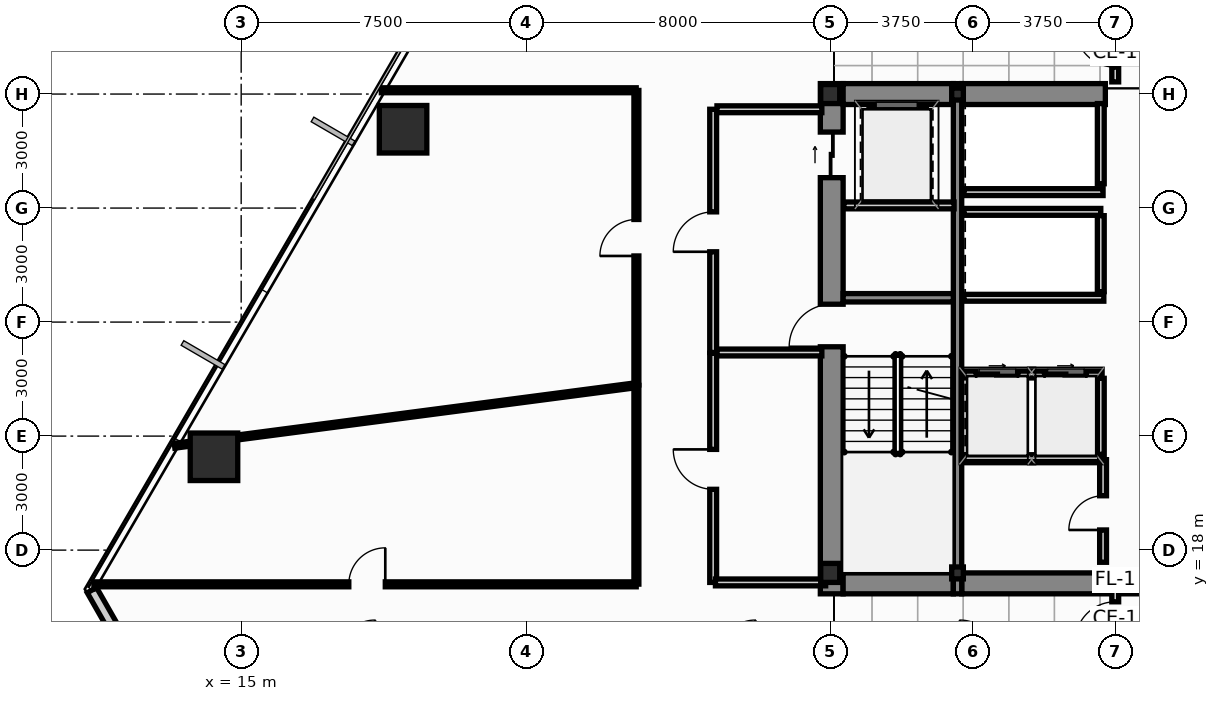
"""IFC4 building model, lengths in metres.
Left out: names, types, materials, properties, quantities, classifications, styles, units other than length and angle.
Written with IfcOpenShell. Run it as: python <this file> out.ifc"""

import sys

from ifc_helpers import new_model, si_unit, direction, frame, frame_2d, origin, origin_2d, place, context, subcontext, project, spatial, rectangle, hollow_rectangle, i_section, extrude, source, transform, mapped, element, fill, save


model = new_model("IFC4")
c1 = context("Model", 3, precision=1e-05, world=origin(), true_north=direction((0.0, 1.0)))
c2 = subcontext(c1, "Body", "Model", "MODEL_VIEW")
j1 = project(units=[si_unit("LENGTHUNIT", "METRE"), si_unit("PLANEANGLEUNIT", "RADIAN")], contexts=[c1])
p1 = place(None, origin())
s1 = spatial("IfcSite", under=j1, at=p1, CompositionType="ELEMENT")
p2 = place(p1, origin())
s2 = spatial("IfcBuilding", under=s1, at=p2, CompositionType="ELEMENT")
p3 = place(p2, frame((0.0, 0.0, 49.5)))
s3 = spatial("IfcBuildingStorey", under=s2, at=p3, CompositionType="ELEMENT", Elevation=49.5)
m1 = source(origin(), c2, "Body", "SweptSolid", [
    extrude(i_section(OverallWidth=0.5, OverallDepth=0.5, WebThickness=0.028, FlangeThickness=0.04, at=origin_2d()), origin(), (0.0, 0.0, 1.0), 3.65),
])
for number, where, z_axis, x_axis in (
    (1, (30.5, 17.4, 0.0), (0.0, 0.0, 1.0), (1.0, 0.0, 0.0)),
    (2, (30.5, 30.0, 0.0), (0.0, 0.0, 1.0), (1.0, 0.0, 0.0)),
):
    element("IfcColumn", number, at=place(p3, frame(where, z_axis=z_axis, x_axis=x_axis)), inside=s3, PredefinedType="COLUMN", context=c2, shape_type="MappedRepresentation", body=[
        mapped(m1, transform((0.0, 0.0, 0.0), scale=1.0)),
    ])
m2 = source(origin(), c2, "Body", "SweptSolid", [
    extrude(i_section(OverallWidth=0.307, OverallDepth=0.315, WebThickness=0.012, FlangeThickness=0.019, at=origin_2d()), origin(), (0.0, 0.0, 1.0), 3.65),
])
for number, where, z_axis, x_axis in (
    (3, (33.85, 17.4, 0.0), (0.0, 0.0, 1.0), (1.0, 0.0, 0.0)),
    (4, (33.85, 30.0, 0.0), (0.0, 0.0, 1.0), (1.0, 0.0, 0.0)),
):
    element("IfcColumn", number, at=place(p3, frame(where, z_axis=z_axis, x_axis=x_axis)), inside=s3, PredefinedType="COLUMN", context=c2, shape_type="MappedRepresentation", body=[
        mapped(m2, transform((0.0, 0.0, 0.0), scale=1.0)),
    ])
p4 = place(p3, frame((30.54, 16.85, 0.0), z_axis=(0.0, 0.0, 1.0), x_axis=(0.0, 1.0, 0.0)))
e5 = element("IfcWall", 5, at=p4, inside=s3, PredefinedType="SHEAR", context=c2, shape_type="SweptSolid", body=[
    extrude(rectangle(XDim=13.425, YDim=0.6, at=frame_2d((6.712, 0.0))), origin(), (0.0, 0.0, 1.0), 3.65),
])
p5 = place(p4, frame((6.5, 0.0, 0.0)))
e6 = element("IfcOpeningElement", 6, at=p5, cuts=e5, PredefinedType="OPENING", context=c2, shape_type="SweptSolid", body=[
    extrude(rectangle(XDim=1.12, YDim=2.15, at=frame_2d((0.56, 1.075))), frame((0.0, 0.312, 0.0), z_axis=(0.0, -1.0, 0.0), x_axis=(1.0, 0.0, 0.0)), (0.0, 0.0, 1.0), 0.624),
])
p6 = place(p4, frame((10.95, 0.0, 0.0)))
e7 = element("IfcOpeningElement", 7, at=p6, cuts=e5, PredefinedType="OPENING", context=c2, shape_type="SweptSolid", body=[
    extrude(rectangle(XDim=1.2, YDim=2.2, at=frame_2d((0.6, 1.1))), frame((0.0, 0.312, 0.0), z_axis=(0.0, -1.0, 0.0), x_axis=(1.0, 0.0, 0.0)), (0.0, 0.0, 1.0), 0.624),
])
p7 = place(p3, frame((30.84, 17.125, 0.0), z_axis=(0.0, 0.0, 1.0), x_axis=(1.0, 0.0, 0.0)))
e8 = element("IfcWall", 8, at=p7, inside=s3, PredefinedType="SHEAR", context=c2, shape_type="SweptSolid", body=[
    extrude(rectangle(XDim=2.9, YDim=0.55, at=frame_2d((1.45, 0.0))), origin(), (0.0, 0.0, 1.0), 3.65),
])
p8 = place(p3, frame((33.96, 17.125, 0.0), z_axis=(0.0, 0.0, 1.0), x_axis=(1.0, 0.0, 0.0)))
e9 = element("IfcWall", 9, at=p8, inside=s3, PredefinedType="SHEAR", context=c2, shape_type="SweptSolid", body=[
    extrude(rectangle(XDim=8.08, YDim=0.55, at=frame_2d((4.04, 0.0))), origin(), (0.0, 0.0, 1.0), 3.65),
])
p9 = place(p3, frame((30.84, 30.0, 0.0), z_axis=(0.0, 0.0, 1.0), x_axis=(1.0, 0.0, 0.0)))
e10 = element("IfcWall", 10, at=p9, inside=s3, PredefinedType="SHEAR", context=c2, shape_type="SweptSolid", body=[
    extrude(rectangle(XDim=2.9, YDim=0.55, at=frame_2d((1.45, 0.0))), origin(), (0.0, 0.0, 1.0), 3.65),
])
p10 = place(p3, frame((33.96, 30.0, 0.0), z_axis=(0.0, 0.0, 1.0), x_axis=(1.0, 0.0, 0.0)))
e11 = element("IfcWall", 11, at=p10, inside=s3, PredefinedType="SHEAR", context=c2, shape_type="SweptSolid", body=[
    extrude(rectangle(XDim=3.78, YDim=0.55, at=frame_2d((1.89, 0.0))), origin(), (0.0, 0.0, 1.0), 3.65),
])
p11 = place(p3, frame((33.85, 16.85, 0.0), z_axis=(0.0, 0.0, 1.0), x_axis=(0.0, 1.0, 0.0)))
e12 = element("IfcWall", 12, at=p11, inside=s3, PredefinedType="SHEAR", context=c2, shape_type="SweptSolid", body=[
    extrude(rectangle(XDim=13.425, YDim=0.22, at=frame_2d((6.712, 0.0))), origin(), (0.0, 0.0, 1.0), 3.65),
])
p12 = place(p3, frame((30.84, 24.64, 0.0), z_axis=(0.0, 0.0, 1.0), x_axis=(1.0, 0.0, 0.0)))
e13 = element("IfcWall", 13, at=p12, inside=s3, PredefinedType="SHEAR", context=c2, shape_type="SweptSolid", body=[
    extrude(rectangle(XDim=2.9, YDim=0.22, at=frame_2d((1.45, 0.0))), origin(), (0.0, 0.0, 1.0), 3.65),
])
m3 = source(origin(), c2, "Body", "SweptSolid", [
    extrude(hollow_rectangle(XDim=1.25, YDim=1.25, WallThickness=0.07, at=origin_2d()), origin(), (0.0, 0.0, 1.0), 3.651),
])
p13 = place(p3, frame((19.26, 29.074, 0.0), z_axis=(0.014913313399, -0.013776424037, 0.999793880369), x_axis=(0.678553674548, 0.734550822447, 0.0)))
e14 = element("IfcColumn", 14, at=p13, inside=s3, PredefinedType="COLUMN", context=c2, shape_type="MappedRepresentation", body=[
    mapped(m3, transform((0.0, 0.0, 0.0), scale=1.0)),
])
m4 = source(origin(), c2, "Body", "SweptSolid", [
    extrude(hollow_rectangle(XDim=1.25, YDim=1.25, WallThickness=0.07, at=origin_2d()), origin(), (0.0, 0.0, 1.0), 3.651),
])
p14 = place(p3, frame((14.284, 20.456, 0.0), z_axis=(0.010498643418, -0.021599119899, 0.999711586662), x_axis=(0.899383059768, 0.437161425336, 0.0)))
e15 = element("IfcColumn", 15, at=p14, inside=s3, PredefinedType="COLUMN", context=c2, shape_type="MappedRepresentation", body=[
    mapped(m4, transform((0.0, 0.0, 0.0), scale=1.0)),
])
p15 = place(p3, frame((18.312, 4.275, 0.0), z_axis=(0.0, 0.0, 1.0), x_axis=(-0.496075884461, 0.868279169885, 0.0)))
e16 = element("IfcWall", 16, at=p15, inside=s3, PredefinedType="STANDARD", context=c2, shape_type="SweptSolid", body=[
    extrude(rectangle(XDim=14.594, YDim=0.28, at=frame_2d((7.297, 0.0))), origin(), (0.0, 0.0, 1.0), 3.4),
])
p16 = place(p15, frame((6.85, 0.0, 0.9)))
e17 = element("IfcOpeningElement", 17, at=p16, cuts=e16, PredefinedType="OPENING", context=c2, shape_type="SweptSolid", body=[
    extrude(rectangle(XDim=1.8, YDim=1.8, at=frame_2d((0.9, 0.9))), frame((0.0, 0.152, 0.0), z_axis=(0.0, -1.0, 0.0), x_axis=(1.0, 0.0, 0.0)), (0.0, 0.0, 1.0), 0.304),
])
p17 = place(p3, frame((34.02, 22.62, 0.0), z_axis=(0.0, 0.0, 1.0), x_axis=(1.0, 0.0, 0.0)))
e18 = element("IfcWall", 18, at=p17, inside=s3, PredefinedType="PARTITIONING", context=c2, shape_type="SweptSolid", body=[
    extrude(rectangle(XDim=3.6, YDim=0.18, at=frame_2d((1.8, 0.0))), origin(), (0.0, 0.0, 1.0), 3.4),
])
p18 = place(p17, frame((0.32, 0.0, 0.0)))
e19 = element("IfcOpeningElement", 19, at=p18, cuts=e18, PredefinedType="OPENING", context=c2, shape_type="SweptSolid", body=[
    extrude(rectangle(XDim=1.1, YDim=2.2, at=frame_2d((0.55, 1.1))), frame((0.0, 0.102, 0.0), z_axis=(0.0, -1.0, 0.0), x_axis=(1.0, 0.0, 0.0)), (0.0, 0.0, 1.0), 0.204),
])
p19 = place(p17, frame((2.12, 0.0, 0.0)))
e20 = element("IfcOpeningElement", 20, at=p19, cuts=e18, PredefinedType="OPENING", context=c2, shape_type="SweptSolid", body=[
    extrude(rectangle(XDim=1.1, YDim=2.2, at=frame_2d((0.55, 1.1))), frame((0.0, 0.102, 0.0), z_axis=(0.0, -1.0, 0.0), x_axis=(1.0, 0.0, 0.0)), (0.0, 0.0, 1.0), 0.204),
])
p20 = place(p3, frame((37.62, 20.52, 0.0), z_axis=(0.0, 0.0, 1.0), x_axis=(0.0, 1.0, 0.0)))
e21 = element("IfcWall", 21, at=p20, inside=s3, PredefinedType="PARTITIONING", context=c2, shape_type="SweptSolid", body=[
    extrude(rectangle(XDim=2.0, YDim=0.18, at=frame_2d((1.0, 0.0))), origin(), (0.0, 0.0, 1.0), 3.4),
])
p21 = place(p3, frame((34.02, 26.9, 0.0), z_axis=(0.0, 0.0, 1.0), x_axis=(1.0, 0.0, 0.0)))
e22 = element("IfcWall", 22, at=p21, inside=s3, PredefinedType="PARTITIONING", context=c2, shape_type="SweptSolid", body=[
    extrude(rectangle(XDim=3.6, YDim=0.18, at=frame_2d((1.8, 0.0))), origin(), (0.0, 0.0, 1.0), 3.4),
])
p22 = place(p3, frame((37.62, 24.8, 0.0), z_axis=(0.0, 0.0, 1.0), x_axis=(0.0, 1.0, 0.0)))
e23 = element("IfcWall", 23, at=p22, inside=s3, PredefinedType="PARTITIONING", context=c2, shape_type="SweptSolid", body=[
    extrude(rectangle(XDim=2.0, YDim=0.18, at=frame_2d((1.0, 0.0))), origin(), (0.0, 0.0, 1.0), 3.4),
])
p23 = place(p3, frame((34.02, 24.64, 0.0), z_axis=(0.0, 0.0, 1.0), x_axis=(1.0, 0.0, 0.0)))
e24 = element("IfcWall", 24, at=p23, inside=s3, PredefinedType="PARTITIONING", context=c2, shape_type="SweptSolid", body=[
    extrude(rectangle(XDim=3.68, YDim=0.18, at=frame_2d((1.84, 0.0))), origin(), (0.0, 0.0, 1.0), 3.4),
])
p24 = place(p3, frame((34.02, 27.42, 0.0), z_axis=(0.0, 0.0, 1.0), x_axis=(1.0, 0.0, 0.0)))
e25 = element("IfcWall", 25, at=p24, inside=s3, PredefinedType="PARTITIONING", context=c2, shape_type="SweptSolid", body=[
    extrude(rectangle(XDim=3.66, YDim=0.18, at=frame_2d((1.83, 0.0))), origin(), (0.0, 0.0, 1.0), 3.4),
])
p25 = place(p3, frame((37.62, 27.64, 0.0), z_axis=(0.0, 0.0, 1.0), x_axis=(0.0, 1.0, 0.0)))
e26 = element("IfcWall", 26, at=p25, inside=s3, PredefinedType="PARTITIONING", context=c2, shape_type="SweptSolid", body=[
    extrude(rectangle(XDim=2.11, YDim=0.18, at=frame_2d((1.055, 0.0))), origin(), (0.0, 0.0, 1.0), 3.4),
])
p26 = place(p3, frame((27.42, 23.2, 0.0), z_axis=(0.0, 0.0, 1.0), x_axis=(0.0, 1.0, 0.0)))
e27 = element("IfcWall", 27, at=p26, inside=s3, PredefinedType="PARTITIONING", context=c2, shape_type="SweptSolid", body=[
    extrude(rectangle(XDim=6.4, YDim=0.18, at=frame_2d((3.2, 0.0))), origin(), (0.0, 0.0, 1.0), 3.4),
])
p27 = place(p26, frame((2.65, 0.0, 0.0)))
e28 = element("IfcOpeningElement", 28, at=p27, cuts=e27, PredefinedType="OPENING", context=c2, shape_type="SweptSolid", body=[
    extrude(rectangle(XDim=1.05, YDim=2.15, at=frame_2d((0.525, 1.075))), frame((0.0, 0.102, 0.0), z_axis=(0.0, -1.0, 0.0), x_axis=(1.0, 0.0, 0.0)), (0.0, 0.0, 1.0), 0.204),
])
p28 = place(p3, frame((27.52, 23.2, 0.0), z_axis=(0.0, 0.0, 1.0), x_axis=(1.0, 0.0, 0.0)))
e29 = element("IfcWall", 29, at=p28, inside=s3, PredefinedType="PARTITIONING", context=c2, shape_type="SweptSolid", body=[
    extrude(rectangle(XDim=2.76, YDim=0.18, at=frame_2d((1.38, 0.0))), origin(), (0.0, 0.0, 1.0), 3.4),
])
p29 = place(p3, frame((27.52, 29.6, 0.0), z_axis=(0.0, 0.0, 1.0), x_axis=(1.0, 0.0, 0.0)))
e30 = element("IfcWall", 30, at=p29, inside=s3, PredefinedType="PARTITIONING", context=c2, shape_type="SweptSolid", body=[
    extrude(rectangle(XDim=2.76, YDim=0.18, at=frame_2d((1.38, 0.0))), origin(), (0.0, 0.0, 1.0), 2.783),
])
p30 = place(p3, frame((30.86, 27.07, 0.0), z_axis=(0.0, 0.0, 1.0), x_axis=(1.0, 0.0, 0.0)))
e31 = element("IfcWall", 31, at=p30, inside=s3, PredefinedType="PARTITIONING", context=c2, shape_type="SweptSolid", body=[
    extrude(rectangle(XDim=2.9, YDim=0.18, at=frame_2d((1.45, 0.0))), origin(), (0.0, 0.0, 1.0), 3.4),
])
p31 = place(p3, frame((34.02, 20.42, 0.0), z_axis=(0.0, 0.0, 1.0), x_axis=(1.0, 0.0, 0.0)))
e32 = element("IfcWall", 32, at=p31, inside=s3, PredefinedType="PARTITIONING", context=c2, shape_type="SweptSolid", body=[
    extrude(rectangle(XDim=3.64, YDim=0.18, at=frame_2d((1.82, 0.0))), origin(), (0.0, 0.0, 1.0), 3.4),
])
p32 = place(p3, frame((37.68, 17.68, 0.0), z_axis=(0.0, 0.0, 1.0), x_axis=(0.0, 1.0, 0.0)))
e33 = element("IfcWall", 33, at=p32, inside=s3, PredefinedType="PARTITIONING", context=c2, shape_type="SweptSolid", body=[
    extrude(rectangle(XDim=2.7, YDim=0.18, at=frame_2d((1.35, 0.0))), origin(), (0.0, 0.0, 1.0), 3.4),
])
p33 = place(p32, frame((0.85, 0.0, 0.0)))
e34 = element("IfcOpeningElement", 34, at=p33, cuts=e33, PredefinedType="OPENING", context=c2, shape_type="SweptSolid", body=[
    extrude(rectangle(XDim=0.9, YDim=2.1, at=frame_2d((0.45, 1.05))), frame((0.0, 0.102, 0.0), z_axis=(0.0, -1.0, 0.0), x_axis=(1.0, 0.0, 0.0)), (0.0, 0.0, 1.0), 0.204),
])
p34 = place(p3, frame((27.42, 17.15, 0.0), z_axis=(0.0, 0.0, 1.0), x_axis=(0.0, 1.0, 0.0)))
e35 = element("IfcWall", 35, at=p34, inside=s3, PredefinedType="PARTITIONING", context=c2, shape_type="SweptSolid", body=[
    extrude(rectangle(XDim=6.03, YDim=0.18, at=frame_2d((3.015, 0.0))), origin(), (0.0, 0.0, 1.0), 3.026),
])
p35 = place(p34, frame((2.45, 0.0, 0.0)))
e36 = element("IfcOpeningElement", 36, at=p35, cuts=e35, PredefinedType="OPENING", context=c2, shape_type="SweptSolid", body=[
    extrude(rectangle(XDim=1.05, YDim=2.15, at=frame_2d((0.525, 1.075))), frame((0.0, 0.102, 0.0), z_axis=(0.0, -1.0, 0.0), x_axis=(1.0, 0.0, 0.0)), (0.0, 0.0, 1.0), 0.204),
])
p36 = place(p3, frame((27.48, 17.15, 0.0), z_axis=(0.0, 0.0, 1.0), x_axis=(1.0, 0.0, 0.0)))
e37 = element("IfcWall", 37, at=p36, inside=s3, PredefinedType="PARTITIONING", context=c2, shape_type="SweptSolid", body=[
    extrude(rectangle(XDim=2.9, YDim=0.18, at=frame_2d((1.45, 0.0))), origin(), (0.0, 0.0, 1.0), 2.783),
])
p37 = place(p3, frame((11.125, 17.1, 0.0), z_axis=(0.0, 0.0, 1.0), x_axis=(1.0, 0.0, 0.0)))
e38 = element("IfcWall", 38, at=p37, inside=s3, PredefinedType="PARTITIONING", context=c2, shape_type="SweptSolid", body=[
    extrude(rectangle(XDim=14.27, YDim=0.13, at=frame_2d((7.135, 0.0))), origin(), (0.0, 0.0, 1.0), 3.4),
])
p38 = place(p37, frame((6.707, 0.0, 0.0)))
e39 = element("IfcOpeningElement", 39, at=p38, cuts=e38, PredefinedType="OPENING", context=c2, shape_type="SweptSolid", body=[
    extrude(rectangle(XDim=0.96, YDim=2.15, at=frame_2d((0.48, 1.075))), frame((0.0, 0.077, 0.0), z_axis=(0.0, -1.0, 0.0), x_axis=(1.0, 0.0, 0.0)), (0.0, 0.0, 1.0), 0.154),
])
p39 = place(p3, frame((13.247, 20.747, 0.0), z_axis=(0.0, 0.0, 1.0), x_axis=(0.991516983449, 0.129977196202, 0.0)))
e40 = element("IfcWall", 40, at=p39, inside=s3, PredefinedType="PARTITIONING", context=c2, shape_type="SweptSolid", body=[
    extrude(rectangle(XDim=12.252, YDim=0.13, at=frame_2d((6.126, 0.0))), origin(), (0.0, 0.0, 1.0), 3.4),
])
p40 = place(p3, frame((25.4, 22.345, 0.0), z_axis=(0.0, 0.0, 1.0), x_axis=(0.0, 1.0, 0.0)))
e41 = element("IfcWall", 41, at=p40, inside=s3, PredefinedType="PARTITIONING", context=c2, shape_type="SweptSolid", body=[
    extrude(rectangle(XDim=7.75, YDim=0.13, at=frame_2d((3.875, 0.0))), origin(), (0.0, 0.0, 1.0), 3.026),
])
p41 = place(p40, frame((3.395, 0.0, 0.0)))
e42 = element("IfcOpeningElement", 42, at=p41, cuts=e41, PredefinedType="OPENING", context=c2, shape_type="SweptSolid", body=[
    extrude(rectangle(XDim=0.96, YDim=2.15, at=frame_2d((0.48, 1.075))), frame((0.0, 0.077, 0.0), z_axis=(0.0, -1.0, 0.0), x_axis=(1.0, 0.0, 0.0)), (0.0, 0.0, 1.0), 0.154),
])
p42 = place(p3, frame((25.395, 30.1, 0.0), z_axis=(0.0, 0.0, 1.0), x_axis=(-1.0, 0.0, 0.0)))
e43 = element("IfcWall", 43, at=p42, inside=s3, PredefinedType="PARTITIONING", context=c2, shape_type="SweptSolid", body=[
    extrude(rectangle(XDim=6.707, YDim=0.13, at=frame_2d((3.354, 0.0))), origin(), (0.0, 0.0, 1.0), 3.4),
])
p43 = place(p3, frame((25.4, 17.105, 0.0), z_axis=(0.0, 0.0, 1.0), x_axis=(0.0, 1.0, 0.0)))
e44 = element("IfcWall", 44, at=p43, inside=s3, PredefinedType="PARTITIONING", context=c2, shape_type="SweptSolid", body=[
    extrude(rectangle(XDim=5.23, YDim=0.13, at=frame_2d((2.615, 0.0))), origin(), (0.0, 0.0, 1.0), 3.026),
])
p44 = place(p3, frame((38.0, 15.205, 0.0), z_axis=(0.0, 0.0, 1.0), x_axis=(0.0, 1.0, 0.0)))
e45 = element("IfcWall", 45, at=p44, inside=s3, PredefinedType="PARTITIONING", context=c2, shape_type="SweptSolid", body=[
    extrude(rectangle(XDim=1.82, YDim=0.18, at=frame_2d((0.91, 0.0))), origin(), (0.0, 0.0, 1.0), 3.4),
])
p45 = place(p44, frame((0.385, 0.0, 0.0)))
e46 = element("IfcOpeningElement", 46, at=p45, cuts=e45, PredefinedType="OPENING", context=c2, shape_type="SweptSolid", body=[
    extrude(rectangle(XDim=1.05, YDim=2.15, at=frame_2d((0.525, 1.075))), frame((0.0, 0.102, 0.0), z_axis=(0.0, -1.0, 0.0), x_axis=(1.0, 0.0, 0.0)), (0.0, 0.0, 1.0), 0.204),
])
p46 = place(p3, frame((38.0, 30.32, 0.0), z_axis=(0.0, 0.0, 1.0), x_axis=(0.0, 1.0, 0.0)))
e47 = element("IfcWall", 47, at=p46, inside=s3, PredefinedType="PARTITIONING", context=c2, shape_type="SweptSolid", body=[
    extrude(rectangle(XDim=1.825, YDim=0.18, at=frame_2d((0.913, 0.0))), origin(), (0.0, 0.0, 1.0), 3.4),
])
p47 = place(p46, frame((0.388, 0.0, 0.0)))
e48 = element("IfcOpeningElement", 48, at=p47, cuts=e47, PredefinedType="OPENING", context=c2, shape_type="SweptSolid", body=[
    extrude(rectangle(XDim=1.05, YDim=2.15, at=frame_2d((0.525, 1.075))), frame((0.0, 0.102, 0.0), z_axis=(0.0, -1.0, 0.0), x_axis=(1.0, 0.0, 0.0)), (0.0, 0.0, 1.0), 0.204),
])
p48 = place(p5, origin())
e49 = element("IfcDoor", 49, at=p48, inside=s3, OperationType="SINGLE_SWING_LEFT", PredefinedType="DOOR", context=c2, shape_type="SweptSolid", body=[
    extrude(rectangle(XDim=1.12, YDim=2.15, at=frame_2d((0.56, 1.075))), frame((0.0, 0.025, 0.0), z_axis=(0.0, -1.0, 0.0), x_axis=(1.0, 0.0, 0.0)), (0.0, 0.0, 1.0), 0.05),
])
fill(e6, e49)
p49 = place(p6, origin())
e50 = element("IfcDoor", 50, at=p49, inside=s3, OperationType="SLIDING_TO_LEFT", PredefinedType="DOOR", context=c2, shape_type="SweptSolid", body=[
    extrude(rectangle(XDim=1.2, YDim=2.2, at=frame_2d((0.6, 1.1))), frame((0.0, 0.025, 0.0), z_axis=(0.0, -1.0, 0.0), x_axis=(1.0, 0.0, 0.0)), (0.0, 0.0, 1.0), 0.05),
])
fill(e7, e50)
p50 = place(p18, origin())
e51 = element("IfcDoor", 51, at=p50, inside=s3, OperationType="SLIDING_TO_LEFT", PredefinedType="DOOR", context=c2, shape_type="SweptSolid", body=[
    extrude(rectangle(XDim=1.1, YDim=2.2, at=frame_2d((0.55, 1.1))), frame((0.0, 0.025, 0.0), z_axis=(0.0, -1.0, 0.0), x_axis=(1.0, 0.0, 0.0)), (0.0, 0.0, 1.0), 0.05),
])
fill(e19, e51)
p51 = place(p19, origin())
e52 = element("IfcDoor", 52, at=p51, inside=s3, OperationType="SLIDING_TO_RIGHT", PredefinedType="DOOR", context=c2, shape_type="SweptSolid", body=[
    extrude(rectangle(XDim=1.1, YDim=2.2, at=frame_2d((0.55, 1.1))), frame((0.0, 0.025, 0.0), z_axis=(0.0, -1.0, 0.0), x_axis=(1.0, 0.0, 0.0)), (0.0, 0.0, 1.0), 0.05),
])
fill(e20, e52)
p52 = place(p27, origin())
e53 = element("IfcDoor", 53, at=p52, inside=s3, OperationType="SINGLE_SWING_LEFT", PredefinedType="DOOR", context=c2, shape_type="SweptSolid", body=[
    extrude(rectangle(XDim=1.05, YDim=2.15, at=frame_2d((0.525, 1.075))), frame((0.0, 0.025, 0.0), z_axis=(0.0, -1.0, 0.0), x_axis=(1.0, 0.0, 0.0)), (0.0, 0.0, 1.0), 0.05),
])
fill(e28, e53)
p53 = place(p33, origin())
e54 = element("IfcDoor", 54, at=p53, inside=s3, OperationType="SINGLE_SWING_LEFT", PredefinedType="DOOR", context=c2, shape_type="SweptSolid", body=[
    extrude(rectangle(XDim=0.9, YDim=2.1, at=frame_2d((0.45, 1.05))), frame((0.0, 0.025, 0.0), z_axis=(0.0, -1.0, 0.0), x_axis=(1.0, 0.0, 0.0)), (0.0, 0.0, 1.0), 0.05),
])
fill(e34, e54)
p54 = place(p35, origin())
e55 = element("IfcDoor", 55, at=p54, inside=s3, OperationType="SINGLE_SWING_RIGHT", PredefinedType="DOOR", context=c2, shape_type="SweptSolid", body=[
    extrude(rectangle(XDim=1.05, YDim=2.15, at=frame_2d((0.525, 1.075))), frame((0.0, 0.025, 0.0), z_axis=(0.0, -1.0, 0.0), x_axis=(1.0, 0.0, 0.0)), (0.0, 0.0, 1.0), 0.05),
])
fill(e36, e55)
p55 = place(p38, origin())
e56 = element("IfcDoor", 56, at=p55, inside=s3, OperationType="SINGLE_SWING_RIGHT", PredefinedType="DOOR", context=c2, shape_type="SweptSolid", body=[
    extrude(rectangle(XDim=0.96, YDim=2.15, at=frame_2d((0.48, 1.075))), frame((0.0, 0.025, 0.0), z_axis=(0.0, -1.0, 0.0), x_axis=(1.0, 0.0, 0.0)), (0.0, 0.0, 1.0), 0.05),
])
fill(e39, e56)
p56 = place(p41, origin())
e57 = element("IfcDoor", 57, at=p56, inside=s3, OperationType="SINGLE_SWING_LEFT", PredefinedType="DOOR", context=c2, shape_type="SweptSolid", body=[
    extrude(rectangle(XDim=0.96, YDim=2.15, at=frame_2d((0.48, 1.075))), frame((0.0, 0.025, 0.0), z_axis=(0.0, -1.0, 0.0), x_axis=(1.0, 0.0, 0.0)), (0.0, 0.0, 1.0), 0.05),
])
fill(e42, e57)
p57 = place(p45, origin())
e58 = element("IfcDoor", 58, at=p57, inside=s3, OperationType="SINGLE_SWING_LEFT", PredefinedType="DOOR", context=c2, shape_type="SweptSolid", body=[
    extrude(rectangle(XDim=1.05, YDim=2.15, at=frame_2d((0.525, 1.075))), frame((0.0, 0.025, 0.0), z_axis=(0.0, -1.0, 0.0), x_axis=(1.0, 0.0, 0.0)), (0.0, 0.0, 1.0), 0.05),
])
fill(e46, e58)
p58 = place(p47, origin())
e59 = element("IfcDoor", 59, at=p58, inside=s3, OperationType="SINGLE_SWING_RIGHT", PredefinedType="DOOR", context=c2, shape_type="SweptSolid", body=[
    extrude(rectangle(XDim=1.05, YDim=2.15, at=frame_2d((0.525, 1.075))), frame((0.0, 0.025, 0.0), z_axis=(0.0, -1.0, 0.0), x_axis=(1.0, 0.0, 0.0)), (0.0, 0.0, 1.0), 0.05),
])
fill(e48, e59)
save(model, sys.argv[1])
